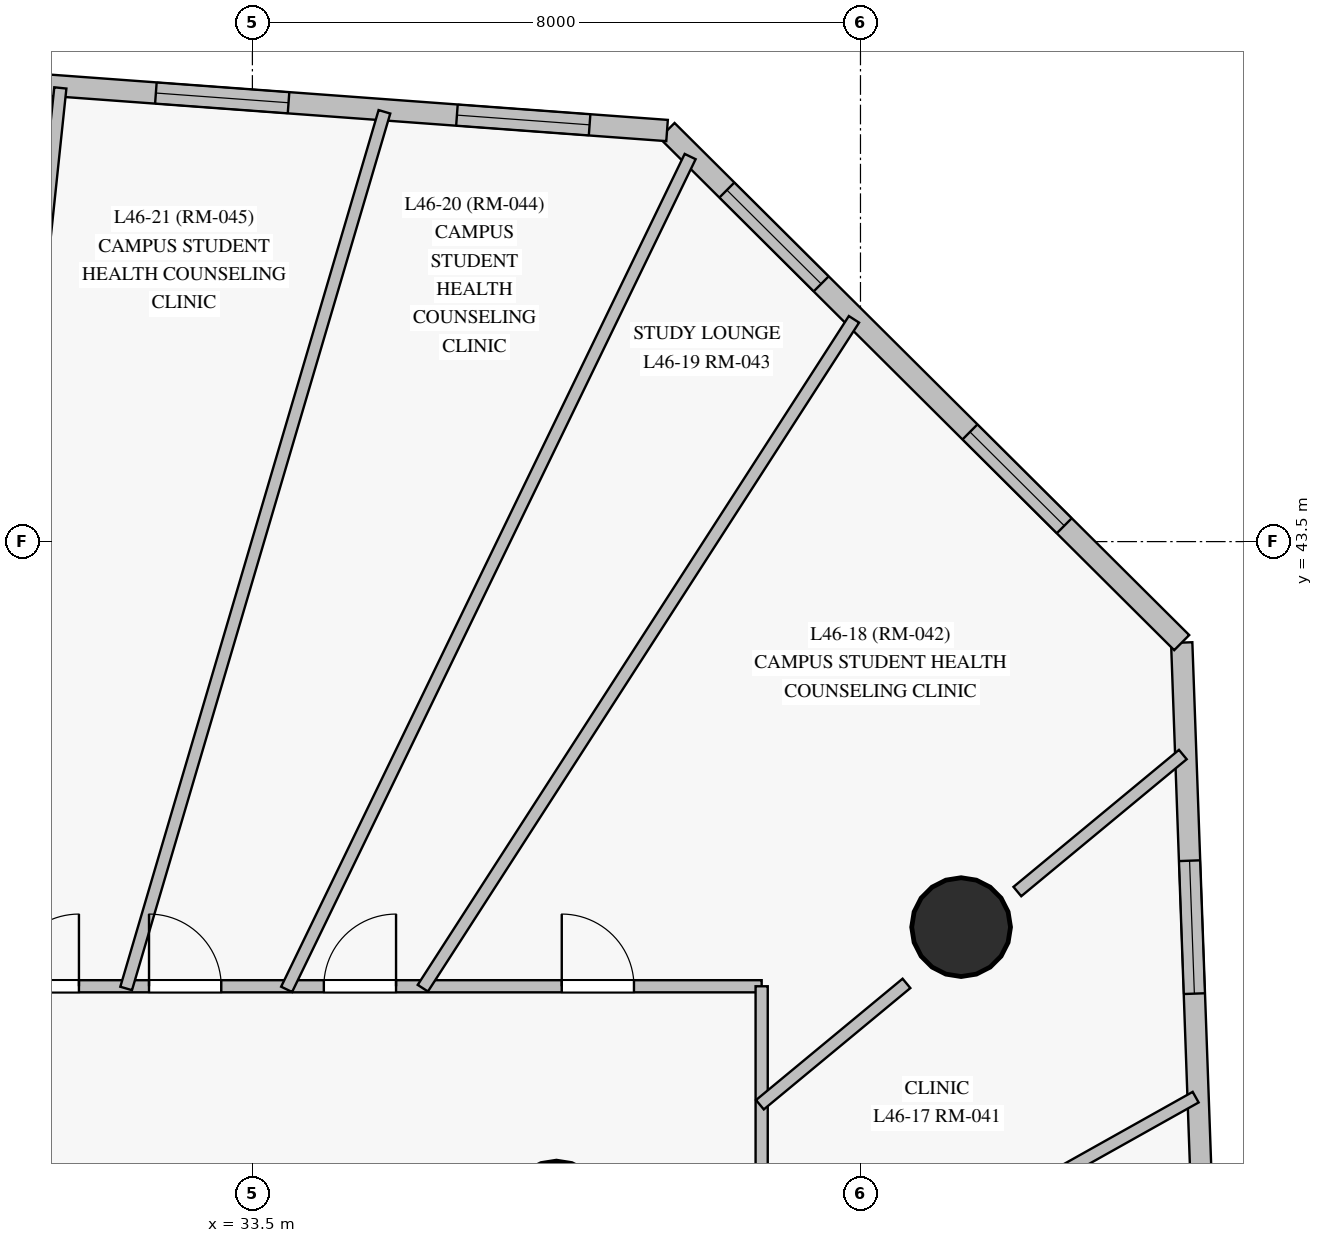
"""IFC4 building model, lengths in metres.
Left out: names, types, materials, properties, quantities, classifications, styles, units other than length and angle.
Written with IfcOpenShell. Run it as: python <this file> out.ifc"""

import sys

from ifc_helpers import new_model, si_unit, direction, frame, frame_2d, origin, origin_with_axes, origin_2d, place, context, subcontext, project, spatial, rectangle, circle, extrude, source, transform, mapped, element, fill, save


model = new_model("IFC4")
c1 = context("Model", 3, precision=1e-05, world=origin(), true_north=direction((0.0, 1.0)))
c2 = subcontext(c1, "Body", "Model", "MODEL_VIEW")
j1 = project(units=[si_unit("LENGTHUNIT", "METRE"), si_unit("PLANEANGLEUNIT", "RADIAN")], contexts=[c1])
p1 = place(None, origin())
s1 = spatial("IfcSite", under=j1, at=p1, CompositionType="ELEMENT")
p2 = place(p1, origin())
s2 = spatial("IfcBuilding", under=s1, at=p2, CompositionType="ELEMENT")
p3 = place(p2, frame((0.0, 0.0, 162.65)))
s3 = spatial("IfcBuildingStorey", under=s2, at=p3, CompositionType="ELEMENT", Elevation=162.65)
m1 = source(origin_with_axes(), c2, "Body", "SweptSolid", [
    extrude(circle(Radius=0.65, at=origin_2d()), origin(), (0.0, 0.0, 1.0), 3.05),
])
for number, where, z_axis, x_axis in (
    (1, (37.5, 34.7, 0.0), (0.0, 0.0, 1.0), (1.0, 0.0, 0.0)),
    (2, (42.824, 38.428, 0.0), (0.0, 0.0, 1.0), (1.0, 0.0, 0.0)),
):
    element("IfcColumn", number, at=place(p3, frame(where, z_axis=z_axis, x_axis=x_axis)), inside=s3, PredefinedType="COLUMN", context=c2, shape_type="MappedRepresentation", body=[
        mapped(m1, transform((0.0, 0.0, 0.0), scale=1.0)),
    ])
p4 = place(p3, frame((46.229, 28.22, 0.0), z_axis=(0.0, 0.0, 1.0), x_axis=(-0.036027137179, 0.999350811971, 0.0)))
e3 = element("IfcWall", 3, at=p4, inside=s3, PredefinedType="SOLIDWALL", context=c2, shape_type="SweptSolid", body=[
    extrude(rectangle(XDim=13.96, YDim=0.28, at=frame_2d((6.98, 0.0))), origin(), (0.0, 0.0, 1.0), 2.825),
])
p5 = place(p4, frame((3.507, 0.0, 0.85)))
e4 = element("IfcOpeningElement", 4, at=p5, cuts=e3, PredefinedType="OPENING", context=c2, shape_type="SweptSolid", body=[
    extrude(rectangle(XDim=1.75, YDim=1.65, at=frame_2d((0.875, 0.825))), frame((0.0, 0.15, 0.0), z_axis=(0.0, -1.0, 0.0), x_axis=(1.0, 0.0, 0.0)), (0.0, 0.0, 1.0), 0.3),
])
p6 = place(p4, frame((9.339, 0.0, 0.85)))
e5 = element("IfcOpeningElement", 5, at=p6, cuts=e3, PredefinedType="OPENING", context=c2, shape_type="SweptSolid", body=[
    extrude(rectangle(XDim=1.75, YDim=1.65, at=frame_2d((0.875, 0.825))), frame((0.0, 0.15, 0.0), z_axis=(0.0, -1.0, 0.0), x_axis=(1.0, 0.0, 0.0)), (0.0, 0.0, 1.0), 0.3),
])
p7 = place(p3, frame((45.726, 42.171, 0.0), z_axis=(0.0, 0.0, 1.0), x_axis=(-0.708868189889, 0.70534097383, 0.0)))
e6 = element("IfcWall", 6, at=p7, inside=s3, PredefinedType="SOLIDWALL", context=c2, shape_type="SweptSolid", body=[
    extrude(rectangle(XDim=9.552, YDim=0.28, at=frame_2d((4.776, 0.0))), origin(), (0.0, 0.0, 1.0), 2.825),
])
p8 = place(p7, frame((2.18, 0.0, 0.85)))
e7 = element("IfcOpeningElement", 7, at=p8, cuts=e6, PredefinedType="OPENING", context=c2, shape_type="SweptSolid", body=[
    extrude(rectangle(XDim=1.75, YDim=1.65, at=frame_2d((0.875, 0.825))), frame((0.0, 0.15, 0.0), z_axis=(0.0, -1.0, 0.0), x_axis=(1.0, 0.0, 0.0)), (0.0, 0.0, 1.0), 0.3),
])
p9 = place(p7, frame((6.691, 0.0, 0.85)))
e8 = element("IfcOpeningElement", 8, at=p9, cuts=e6, PredefinedType="OPENING", context=c2, shape_type="SweptSolid", body=[
    extrude(rectangle(XDim=1.75, YDim=1.65, at=frame_2d((0.875, 0.825))), frame((0.0, 0.15, 0.0), z_axis=(0.0, -1.0, 0.0), x_axis=(1.0, 0.0, 0.0)), (0.0, 0.0, 1.0), 0.3),
])
p10 = place(p3, frame((38.955, 48.908, 0.0), z_axis=(0.0, 0.0, 1.0), x_axis=(-0.997320223423, 0.07315990672, 0.0)))
e9 = element("IfcWall", 9, at=p10, inside=s3, PredefinedType="SOLIDWALL", context=c2, shape_type="SweptSolid", body=[
    extrude(rectangle(XDim=12.053, YDim=0.28, at=frame_2d((6.027, 0.0))), origin(), (0.0, 0.0, 1.0), 2.825),
])
p11 = place(p10, frame((1.022, 0.0, 0.85)))
e10 = element("IfcOpeningElement", 10, at=p11, cuts=e9, PredefinedType="OPENING", context=c2, shape_type="SweptSolid", body=[
    extrude(rectangle(XDim=1.75, YDim=1.65, at=frame_2d((0.875, 0.825))), frame((0.0, 0.15, 0.0), z_axis=(0.0, -1.0, 0.0), x_axis=(1.0, 0.0, 0.0)), (0.0, 0.0, 1.0), 0.3),
])
p12 = place(p10, frame((4.993, 0.0, 0.85)))
e11 = element("IfcOpeningElement", 11, at=p12, cuts=e9, PredefinedType="OPENING", context=c2, shape_type="SweptSolid", body=[
    extrude(rectangle(XDim=1.75, YDim=1.65, at=frame_2d((0.875, 0.825))), frame((0.0, 0.15, 0.0), z_axis=(0.0, -1.0, 0.0), x_axis=(1.0, 0.0, 0.0)), (0.0, 0.0, 1.0), 0.3),
])
p13 = place(p10, frame((9.123, 0.0, 0.85)))
e12 = element("IfcOpeningElement", 12, at=p13, cuts=e9, PredefinedType="OPENING", context=c2, shape_type="SweptSolid", body=[
    extrude(rectangle(XDim=1.75, YDim=1.65, at=frame_2d((0.875, 0.825))), frame((0.0, 0.15, 0.0), z_axis=(0.0, -1.0, 0.0), x_axis=(1.0, 0.0, 0.0)), (0.0, 0.0, 1.0), 0.3),
])
p14 = place(p3, frame((16.7, 37.65, 0.0), z_axis=(0.0, 0.0, 1.0), x_axis=(1.0, 0.0, 0.0)))
e13 = element("IfcWall", 13, at=p14, inside=s3, PredefinedType="PARTITIONING", context=c2, shape_type="SweptSolid", body=[
    extrude(rectangle(XDim=23.5, YDim=0.16, at=frame_2d((11.75, 0.0))), origin(), (0.0, 0.0, 1.0), 2.375),
])
p15 = place(p14, frame((20.87, 0.0, 0.0)))
e14 = element("IfcOpeningElement", 14, at=p15, cuts=e13, PredefinedType="OPENING", context=c2, shape_type="SweptSolid", body=[
    extrude(rectangle(XDim=0.95, YDim=2.15, at=frame_2d((0.475, 1.075))), frame((0.0, 0.09, 0.0), z_axis=(0.0, -1.0, 0.0), x_axis=(1.0, 0.0, 0.0)), (0.0, 0.0, 1.0), 0.18),
])
p16 = place(p14, frame((17.74, 0.0, 0.0)))
e15 = element("IfcOpeningElement", 15, at=p16, cuts=e13, PredefinedType="OPENING", context=c2, shape_type="SweptSolid", body=[
    extrude(rectangle(XDim=0.95, YDim=2.15, at=frame_2d((0.475, 1.075))), frame((0.0, 0.09, 0.0), z_axis=(0.0, -1.0, 0.0), x_axis=(1.0, 0.0, 0.0)), (0.0, 0.0, 1.0), 0.18),
])
p17 = place(p14, frame((15.44, 0.0, 0.0)))
e16 = element("IfcOpeningElement", 16, at=p17, cuts=e13, PredefinedType="OPENING", context=c2, shape_type="SweptSolid", body=[
    extrude(rectangle(XDim=0.95, YDim=2.15, at=frame_2d((0.475, 1.075))), frame((0.0, 0.09, 0.0), z_axis=(0.0, -1.0, 0.0), x_axis=(1.0, 0.0, 0.0)), (0.0, 0.0, 1.0), 0.18),
])
p18 = place(p14, frame((13.568, 0.0, 0.0)))
e17 = element("IfcOpeningElement", 17, at=p18, cuts=e13, PredefinedType="OPENING", context=c2, shape_type="SweptSolid", body=[
    extrude(rectangle(XDim=0.95, YDim=2.15, at=frame_2d((0.475, 1.075))), frame((0.0, 0.09, 0.0), z_axis=(0.0, -1.0, 0.0), x_axis=(1.0, 0.0, 0.0)), (0.0, 0.0, 1.0), 0.18),
])
p19 = place(p14, frame((11.365, 0.0, 0.0)))
e18 = element("IfcOpeningElement", 18, at=p19, cuts=e13, PredefinedType="OPENING", context=c2, shape_type="SweptSolid", body=[
    extrude(rectangle(XDim=0.95, YDim=2.15, at=frame_2d((0.475, 1.075))), frame((0.0, 0.09, 0.0), z_axis=(0.0, -1.0, 0.0), x_axis=(1.0, 0.0, 0.0)), (0.0, 0.0, 1.0), 0.18),
])
p20 = place(p14, frame((9.159, 0.0, 0.0)))
e19 = element("IfcOpeningElement", 19, at=p20, cuts=e13, PredefinedType="OPENING", context=c2, shape_type="SweptSolid", body=[
    extrude(rectangle(XDim=0.95, YDim=2.15, at=frame_2d((0.475, 1.075))), frame((0.0, 0.09, 0.0), z_axis=(0.0, -1.0, 0.0), x_axis=(1.0, 0.0, 0.0)), (0.0, 0.0, 1.0), 0.18),
])
p21 = place(p14, frame((5.89, 0.0, 0.0)))
e20 = element("IfcOpeningElement", 20, at=p21, cuts=e13, PredefinedType="OPENING", context=c2, shape_type="SweptSolid", body=[
    extrude(rectangle(XDim=0.95, YDim=2.15, at=frame_2d((0.475, 1.075))), frame((0.0, 0.09, 0.0), z_axis=(0.0, -1.0, 0.0), x_axis=(1.0, 0.0, 0.0)), (0.0, 0.0, 1.0), 0.18),
])
p22 = place(p14, frame((3.698, 0.0, 0.0)))
e21 = element("IfcOpeningElement", 21, at=p22, cuts=e13, PredefinedType="OPENING", context=c2, shape_type="SweptSolid", body=[
    extrude(rectangle(XDim=0.95, YDim=2.15, at=frame_2d((0.475, 1.075))), frame((0.0, 0.09, 0.0), z_axis=(0.0, -1.0, 0.0), x_axis=(1.0, 0.0, 0.0)), (0.0, 0.0, 1.0), 0.18),
])
p23 = place(p14, frame((1.277, 0.0, 0.0)))
e22 = element("IfcOpeningElement", 22, at=p23, cuts=e13, PredefinedType="OPENING", context=c2, shape_type="SweptSolid", body=[
    extrude(rectangle(XDim=0.86, YDim=2.04, at=frame_2d((0.43, 1.02))), frame((0.0, 0.09, 0.0), z_axis=(0.0, -1.0, 0.0), x_axis=(1.0, 0.0, 0.0)), (0.0, 0.0, 1.0), 0.18),
])
p24 = place(p3, frame((40.2, 37.65, 0.0), z_axis=(0.0, 0.0, 1.0), x_axis=(0.0, -1.0, 0.0)))
e23 = element("IfcWall", 23, at=p24, inside=s3, PredefinedType="PARTITIONING", context=c2, shape_type="SweptSolid", body=[
    extrude(rectangle(XDim=22.3, YDim=0.16, at=frame_2d((11.15, 0.0))), origin(), (0.0, 0.0, 1.0), 2.375),
])
p25 = place(p24, frame((14.02, 0.0, 0.0)))
e24 = element("IfcOpeningElement", 24, at=p25, cuts=e23, PredefinedType="OPENING", context=c2, shape_type="SweptSolid", body=[
    extrude(rectangle(XDim=0.95, YDim=2.15, at=frame_2d((0.475, 1.075))), frame((0.0, 0.09, 0.0), z_axis=(0.0, -1.0, 0.0), x_axis=(1.0, 0.0, 0.0)), (0.0, 0.0, 1.0), 0.18),
])
p26 = place(p24, frame((10.675, 0.0, 0.0)))
e25 = element("IfcOpeningElement", 25, at=p26, cuts=e23, PredefinedType="OPENING", context=c2, shape_type="SweptSolid", body=[
    extrude(rectangle(XDim=0.95, YDim=2.15, at=frame_2d((0.475, 1.075))), frame((0.0, 0.09, 0.0), z_axis=(0.0, -1.0, 0.0), x_axis=(1.0, 0.0, 0.0)), (0.0, 0.0, 1.0), 0.18),
])
p27 = place(p24, frame((7.33, 0.0, 0.0)))
e26 = element("IfcOpeningElement", 26, at=p27, cuts=e23, PredefinedType="OPENING", context=c2, shape_type="SweptSolid", body=[
    extrude(rectangle(XDim=0.95, YDim=2.15, at=frame_2d((0.475, 1.075))), frame((0.0, 0.09, 0.0), z_axis=(0.0, -1.0, 0.0), x_axis=(1.0, 0.0, 0.0)), (0.0, 0.0, 1.0), 0.18),
])
p28 = place(p24, frame((2.5, 0.0, 0.0)))
e27 = element("IfcOpeningElement", 27, at=p28, cuts=e23, PredefinedType="OPENING", context=c2, shape_type="SweptSolid", body=[
    extrude(rectangle(XDim=0.95, YDim=2.15, at=frame_2d((0.475, 1.075))), frame((0.0, 0.09, 0.0), z_axis=(0.0, -1.0, 0.0), x_axis=(1.0, 0.0, 0.0)), (0.0, 0.0, 1.0), 0.18),
])
p29 = place(p3, frame((33.95, 37.61, 0.0), z_axis=(0.0, 0.0, 1.0), x_axis=(0.436077675218, 0.899909029389, 0.0)))
e28 = element("IfcWall", 28, at=p29, inside=s3, PredefinedType="PARTITIONING", context=c2, shape_type="SweptSolid", body=[
    extrude(rectangle(XDim=12.175, YDim=0.16, at=frame_2d((6.087, 0.0))), origin(), (0.0, 0.0, 1.0), 2.825),
])
p30 = place(p3, frame((31.839, 37.621, 0.0), z_axis=(0.0, 0.0, 1.0), x_axis=(0.282612627523, 0.959234123019, 0.0)))
e29 = element("IfcWall", 29, at=p30, inside=s3, PredefinedType="PARTITIONING", context=c2, shape_type="SweptSolid", body=[
    extrude(rectangle(XDim=12.023, YDim=0.16, at=frame_2d((6.012, 0.0))), origin(), (0.0, 0.0, 1.0), 2.825),
])
p31 = place(p3, frame((29.729, 37.62, 0.0), z_axis=(0.0, 0.0, 1.0), x_axis=(0.104491703071, 0.994525758334, 0.0)))
e30 = element("IfcWall", 30, at=p31, inside=s3, PredefinedType="PARTITIONING", context=c2, shape_type="SweptSolid", body=[
    extrude(rectangle(XDim=11.914, YDim=0.16, at=frame_2d((5.957, 0.0))), origin(), (0.0, 0.0, 1.0), 2.825),
])
p32 = place(p3, frame((35.742, 37.625, 0.0), z_axis=(0.0, 0.0, 1.0), x_axis=(0.541788474869, 0.840514871076, 0.0)))
e31 = element("IfcWall", 31, at=p32, inside=s3, PredefinedType="PARTITIONING", context=c2, shape_type="SweptSolid", body=[
    extrude(rectangle(XDim=10.469, YDim=0.16, at=frame_2d((5.235, 0.0))), origin(), (0.0, 0.0, 1.0), 2.825),
])
p33 = place(p3, frame((40.174, 32.976, 0.0), z_axis=(0.0, 0.0, 1.0), x_axis=(0.872278632977, 0.489009188514, 0.0)))
e32 = element("IfcWall", 32, at=p33, inside=s3, PredefinedType="PARTITIONING", context=c2, shape_type="SweptSolid", body=[
    extrude(rectangle(XDim=6.576, YDim=0.16, at=frame_2d((3.288, 0.0))), origin(), (0.0, 0.0, 1.0), 2.825),
])
p34 = place(p3, frame((43.564, 38.896, 0.0), z_axis=(0.0, 0.0, 1.0), x_axis=(0.770214325441, 0.637785146336, 0.0)))
e33 = element("IfcWall", 33, at=p34, inside=s3, PredefinedType="PARTITIONING", context=c2, shape_type="SweptSolid", body=[
    extrude(rectangle(XDim=2.826, YDim=0.16, at=frame_2d((1.413, 0.0))), origin(), (0.0, 0.0, 1.0), 2.825),
])
p35 = place(p3, frame((40.177, 36.091, 0.0), z_axis=(0.0, 0.0, 1.0), x_axis=(0.77021590508, 0.637783238696, 0.0)))
e34 = element("IfcWall", 34, at=p35, inside=s3, PredefinedType="PARTITIONING", context=c2, shape_type="SweptSolid", body=[
    extrude(rectangle(XDim=2.503, YDim=0.16, at=frame_2d((1.252, 0.0))), origin(), (0.0, 0.0, 1.0), 2.275),
])
m2 = source(origin_with_axes(), c2, "Body", "SweptSolid", [
    extrude(rectangle(XDim=1.75, YDim=1.65, at=frame_2d((0.875, 0.825))), frame((0.0, 0.03, 0.0), z_axis=(0.0, -1.0, 0.0), x_axis=(1.0, 0.0, 0.0)), (0.0, 0.0, 1.0), 0.06),
])
p36 = place(p6, origin())
e35 = element("IfcWindow", 35, at=p36, inside=s3, PartitioningType="SINGLE_PANEL", PredefinedType="WINDOW", context=c2, shape_type="MappedRepresentation", body=[
    mapped(m2, transform((0.0, 0.0, 0.0), scale=1.0)),
])
fill(e5, e35)
p37 = place(p8, origin())
e36 = element("IfcWindow", 36, at=p37, inside=s3, PartitioningType="SINGLE_PANEL", PredefinedType="WINDOW", context=c2, shape_type="MappedRepresentation", body=[
    mapped(m2, transform((0.0, 0.0, 0.0), scale=1.0)),
])
fill(e7, e36)
p38 = place(p9, origin())
e37 = element("IfcWindow", 37, at=p38, inside=s3, PartitioningType="SINGLE_PANEL", PredefinedType="WINDOW", context=c2, shape_type="MappedRepresentation", body=[
    mapped(m2, transform((0.0, 0.0, 0.0), scale=1.0)),
])
fill(e8, e37)
p39 = place(p11, origin())
e38 = element("IfcWindow", 38, at=p39, inside=s3, PartitioningType="SINGLE_PANEL", PredefinedType="WINDOW", context=c2, shape_type="MappedRepresentation", body=[
    mapped(m2, transform((0.0, 0.0, 0.0), scale=1.0)),
])
fill(e10, e38)
p40 = place(p12, origin())
e39 = element("IfcWindow", 39, at=p40, inside=s3, PartitioningType="SINGLE_PANEL", PredefinedType="WINDOW", context=c2, shape_type="MappedRepresentation", body=[
    mapped(m2, transform((0.0, 0.0, 0.0), scale=1.0)),
])
fill(e11, e39)
m3 = source(origin_with_axes(), c2, "Body", "SweptSolid", [
    extrude(rectangle(XDim=0.95, YDim=2.15, at=frame_2d((0.475, 1.075))), frame((0.0, 0.025, 0.0), z_axis=(0.0, -1.0, 0.0), x_axis=(1.0, 0.0, 0.0)), (0.0, 0.0, 1.0), 0.05),
])
p41 = place(p15, origin())
e40 = element("IfcDoor", 40, at=p41, inside=s3, OperationType="SINGLE_SWING_LEFT", PredefinedType="DOOR", context=c2, shape_type="MappedRepresentation", body=[
    mapped(m3, transform((0.0, 0.0, 0.0), scale=1.0)),
])
fill(e14, e40)
p42 = place(p16, origin())
e41 = element("IfcDoor", 41, at=p42, inside=s3, OperationType="SINGLE_SWING_RIGHT", PredefinedType="DOOR", context=c2, shape_type="MappedRepresentation", body=[
    mapped(m3, transform((0.0, 0.0, 0.0), scale=1.0)),
])
fill(e15, e41)
p43 = place(p17, origin())
e42 = element("IfcDoor", 42, at=p43, inside=s3, OperationType="SINGLE_SWING_LEFT", PredefinedType="DOOR", context=c2, shape_type="MappedRepresentation", body=[
    mapped(m3, transform((0.0, 0.0, 0.0), scale=1.0)),
])
fill(e16, e42)
p44 = place(p18, origin())
e43 = element("IfcDoor", 43, at=p44, inside=s3, OperationType="SINGLE_SWING_RIGHT", PredefinedType="DOOR", context=c2, shape_type="MappedRepresentation", body=[
    mapped(m3, transform((0.0, 0.0, 0.0), scale=1.0)),
])
fill(e17, e43)
save(model, sys.argv[1])
